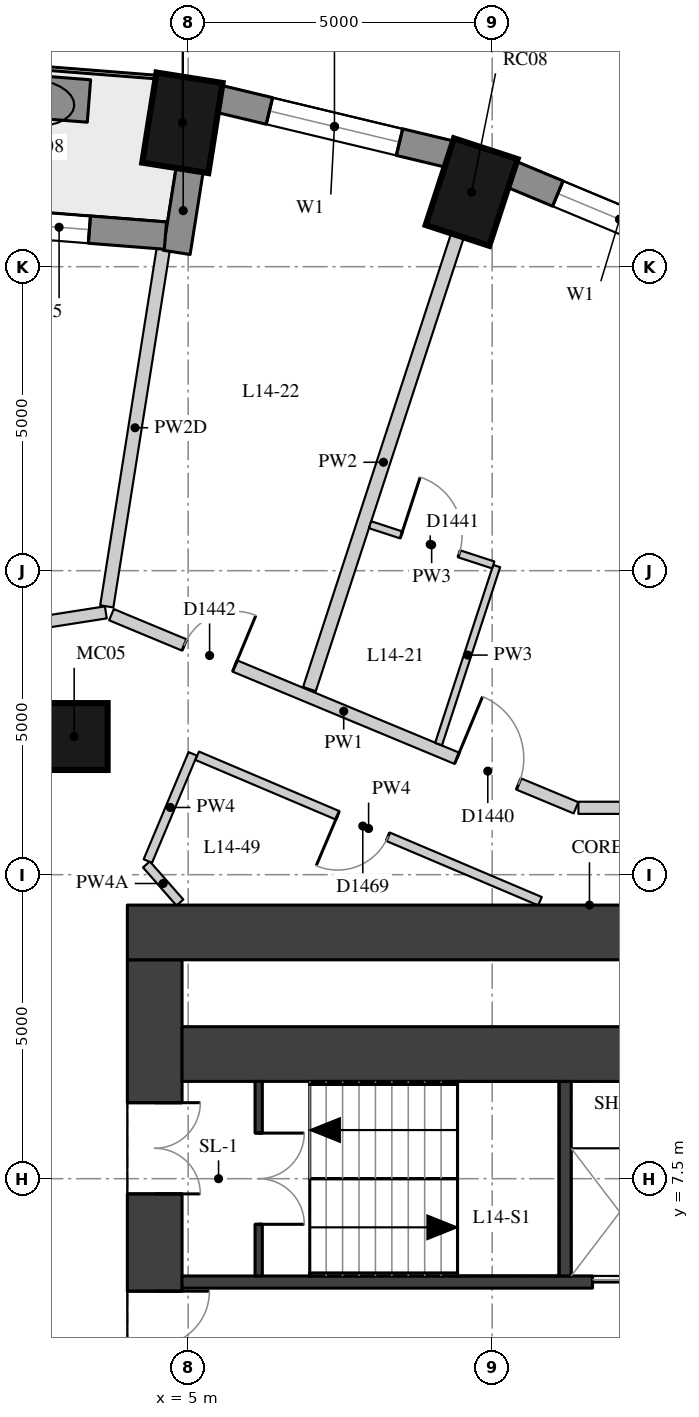
"""IFC4 building model, lengths in metres.
Left out: names, types, materials, properties, quantities, classifications, styles, units other than length and angle.
Written with IfcOpenShell. Run it as: python <this file> out.ifc"""

import sys

from ifc_helpers import new_model, si_unit, direction, frame, frame_2d, origin, origin_2d, place, context, subcontext, project, spatial, rectangle, extrude, element, fill, save


model = new_model("IFC4")
c1 = context("Model", 3, precision=1e-05, world=origin(), true_north=direction((0.0, 1.0)))
c2 = subcontext(c1, "Body", "Model", "MODEL_VIEW")
j1 = project(units=[si_unit("LENGTHUNIT", "METRE"), si_unit("PLANEANGLEUNIT", "RADIAN")], contexts=[c1])
p1 = place(None, origin())
s1 = spatial("IfcSite", under=j1, at=p1, CompositionType="ELEMENT")
p2 = place(p1, origin())
s2 = spatial("IfcBuilding", under=s1, at=p2, CompositionType="ELEMENT")
p3 = place(p2, frame((0.0, 0.0, 54.7)))
s3 = spatial("IfcBuildingStorey", under=s2, at=p3, CompositionType="ELEMENT", Elevation=54.7)
for number, where, z_axis, x_axis in (
    (1, (9.662, 23.727, 0.0), (0.0, 0.0, 1.0), (0.31, 0.951, 0.0)),
    (2, (4.906, 24.866, 0.0), (0.0, 0.0, 1.0), (0.156, 0.988, 0.0)),
):
    element("IfcColumn", number, at=place(p3, frame(where, z_axis=z_axis, x_axis=x_axis)), inside=s3, PredefinedType="COLUMN", context=c2, shape_type="SweptSolid", body=[
        extrude(rectangle(XDim=1.5, YDim=1.1, at=origin_2d()), origin(), (0.0, 0.0, 1.0), 3.3),
    ])
p4 = place(p3, frame((3.126, 14.772, 0.0), z_axis=(0.0, 0.0, 1.0), x_axis=(1.0, 0.0, 0.0)))
e3 = element("IfcColumn", 3, at=p4, inside=s3, PredefinedType="COLUMN", context=c2, shape_type="SweptSolid", body=[
    extrude(rectangle(XDim=1.1, YDim=1.1, at=origin_2d()), origin(), (0.0, 0.0, 1.0), 3.3),
])
p5 = place(p3, frame((13.875, 22.537, 0.0), z_axis=(0.0, 0.0, 1.0), x_axis=(-0.923031964282, 0.384723267966, 0.0)))
e4 = element("IfcWall", 4, at=p5, inside=s3, PredefinedType="SOLIDWALL", context=c2, shape_type="SweptSolid", body=[
    extrude(rectangle(XDim=3.856, YDim=0.45, at=frame_2d((1.928, 0.0))), origin(), (0.0, 0.0, 1.0), 3.02),
])
p6 = place(p5, frame((0.828, 0.0, 0.4)))
e5 = element("IfcOpeningElement", 5, at=p6, cuts=e4, PredefinedType="OPENING", context=c2, shape_type="SweptSolid", body=[
    extrude(rectangle(XDim=2.2, YDim=1.75, at=frame_2d((1.1, 0.875))), frame((0.0, 0.235, 0.0), z_axis=(0.0, -1.0, 0.0), x_axis=(1.0, 0.0, 0.0)), (0.0, 0.0, 1.0), 0.47),
])
p7 = place(p3, frame((9.308, 24.35, 0.0), z_axis=(0.0, 0.0, 1.0), x_axis=(-0.972496561493, 0.232917233979, 0.0)))
e6 = element("IfcWall", 6, at=p7, inside=s3, PredefinedType="SOLIDWALL", context=c2, shape_type="SweptSolid", body=[
    extrude(rectangle(XDim=3.911, YDim=0.45, at=frame_2d((1.956, 0.0))), origin(), (0.0, 0.0, 1.0), 3.02),
])
p8 = place(p7, frame((0.855, 0.0, 0.4)))
e7 = element("IfcOpeningElement", 7, at=p8, cuts=e6, PredefinedType="OPENING", context=c2, shape_type="SweptSolid", body=[
    extrude(rectangle(XDim=2.2, YDim=1.75, at=frame_2d((1.1, 0.875))), frame((0.0, 0.235, 0.0), z_axis=(0.0, -1.0, 0.0), x_axis=(1.0, 0.0, 0.0)), (0.0, 0.0, 1.0), 0.47),
])
p9 = place(p3, frame((5.027, 24.108, 0.0), z_axis=(0.0, 0.0, 1.0), x_axis=(-0.156133927791, -0.98773589415, 0.0)))
e8 = element("IfcWall", 8, at=p9, inside=s3, PredefinedType="SOLIDWALL", context=c2, shape_type="SweptSolid", body=[
    extrude(rectangle(XDim=1.39, YDim=0.45, at=frame_2d((0.695, 0.0))), origin(), (0.0, 0.0, 1.0), 2.47),
])
p10 = place(p3, frame((4.626, 23.011, 0.0), z_axis=(0.0, 0.0, 1.0), x_axis=(-0.996937095772, 0.078207589615, 0.0)))
e9 = element("IfcWall", 9, at=p10, inside=s3, PredefinedType="SOLIDWALL", context=c2, shape_type="SweptSolid", body=[
    extrude(rectangle(XDim=4.657, YDim=0.45, at=frame_2d((2.329, 0.0))), origin(), (0.0, 0.0, 1.0), 3.02),
])
p11 = place(p10, frame((1.254, 0.0, 0.4)))
e10 = element("IfcOpeningElement", 10, at=p11, cuts=e9, PredefinedType="OPENING", context=c2, shape_type="SweptSolid", body=[
    extrude(rectangle(XDim=1.0, YDim=1.75, at=frame_2d((0.5, 0.875))), frame((0.0, 0.235, 0.0), z_axis=(0.0, -1.0, 0.0), x_axis=(1.0, 0.0, 0.0)), (0.0, 0.0, 1.0), 0.47),
])
p12 = place(p10, frame((2.404, 0.0, 0.0)))
e11 = element("IfcOpeningElement", 11, at=p12, cuts=e9, PredefinedType="OPENING", context=c2, shape_type="SweptSolid", body=[
    extrude(rectangle(XDim=1.0, YDim=2.15, at=frame_2d((0.5, 1.075))), frame((0.0, 0.235, 0.0), z_axis=(0.0, -1.0, 0.0), x_axis=(1.0, 0.0, 0.0)), (0.0, 0.0, 1.0), 0.47),
])
p13 = place(p3, frame((3.369, 25.225, 0.0), z_axis=(0.0, 0.0, 1.0), x_axis=(-0.996965267018, 0.077847648384, 0.0)))
e12 = element("IfcWall", 12, at=p13, inside=s3, PredefinedType="USERDEFINED", context=c2, shape_type="SweptSolid", body=[
    extrude(rectangle(XDim=1.8, YDim=0.7, at=frame_2d((0.9, 0.0))), origin(), (0.0, 0.0, 1.0), 0.75),
])
p14 = place(p3, frame((4.45, -11.1, 0.0), z_axis=(0.0, 0.0, 1.0), x_axis=(0.0, 1.0, 0.0)))
e13 = element("IfcWall", 13, at=p14, inside=s3, PredefinedType="SHEAR", context=c2, shape_type="SweptSolid", body=[
    extrude(rectangle(XDim=22.2, YDim=0.9, at=frame_2d((11.1, 0.0))), origin(), (0.0, 0.0, 1.0), 3.02),
])
p15 = place(p14, frame((2.35, 0.0, 0.0)))
e14 = element("IfcOpeningElement", 14, at=p15, cuts=e13, PredefinedType="OPENING", context=c2, shape_type="SweptSolid", body=[
    extrude(rectangle(XDim=1.5, YDim=2.1, at=frame_2d((0.75, 1.05))), frame((0.0, 0.46, 0.0), z_axis=(0.0, -1.0, 0.0), x_axis=(1.0, 0.0, 0.0)), (0.0, 0.0, 1.0), 0.92),
])
p16 = place(p14, frame((5.45, 0.0, 0.0)))
e15 = element("IfcOpeningElement", 15, at=p16, cuts=e13, PredefinedType="OPENING", context=c2, shape_type="SweptSolid", body=[
    extrude(rectangle(XDim=1.8, YDim=2.1, at=frame_2d((0.9, 1.05))), frame((0.0, 0.46, 0.0), z_axis=(0.0, -1.0, 0.0), x_axis=(1.0, 0.0, 0.0)), (0.0, 0.0, 1.0), 0.92),
])
p17 = place(p14, frame((7.95, 0.0, 0.0)))
e16 = element("IfcOpeningElement", 16, at=p17, cuts=e13, PredefinedType="OPENING", context=c2, shape_type="SweptSolid", body=[
    extrude(rectangle(XDim=1.1, YDim=2.1, at=frame_2d((0.55, 1.05))), frame((0.0, 0.46, 0.0), z_axis=(0.0, -1.0, 0.0), x_axis=(1.0, 0.0, 0.0)), (0.0, 0.0, 1.0), 0.92),
])
p18 = place(p14, frame((10.6, 0.0, 0.0)))
e17 = element("IfcOpeningElement", 17, at=p18, cuts=e13, PredefinedType="OPENING", context=c2, shape_type="SweptSolid", body=[
    extrude(rectangle(XDim=1.0, YDim=2.1, at=frame_2d((0.5, 1.05))), frame((0.0, 0.46, 0.0), z_axis=(0.0, -1.0, 0.0), x_axis=(1.0, 0.0, 0.0)), (0.0, 0.0, 1.0), 0.92),
])
p19 = place(p14, frame((13.15, 0.0, 0.0)))
e18 = element("IfcOpeningElement", 18, at=p19, cuts=e13, PredefinedType="OPENING", context=c2, shape_type="SweptSolid", body=[
    extrude(rectangle(XDim=1.1, YDim=2.1, at=frame_2d((0.55, 1.05))), frame((0.0, 0.46, 0.0), z_axis=(0.0, -1.0, 0.0), x_axis=(1.0, 0.0, 0.0)), (0.0, 0.0, 1.0), 0.92),
])
p20 = place(p14, frame((14.95, 0.0, 0.0)))
e19 = element("IfcOpeningElement", 19, at=p20, cuts=e13, PredefinedType="OPENING", context=c2, shape_type="SweptSolid", body=[
    extrude(rectangle(XDim=1.8, YDim=2.1, at=frame_2d((0.9, 1.05))), frame((0.0, 0.46, 0.0), z_axis=(0.0, -1.0, 0.0), x_axis=(1.0, 0.0, 0.0)), (0.0, 0.0, 1.0), 0.92),
])
p21 = place(p14, frame((18.35, 0.0, 0.0)))
e20 = element("IfcOpeningElement", 20, at=p21, cuts=e13, PredefinedType="OPENING", context=c2, shape_type="SweptSolid", body=[
    extrude(rectangle(XDim=1.5, YDim=2.1, at=frame_2d((0.75, 1.05))), frame((0.0, 0.46, 0.0), z_axis=(0.0, -1.0, 0.0), x_axis=(1.0, 0.0, 0.0)), (0.0, 0.0, 1.0), 0.92),
])
p22 = place(p3, frame((4.0, 11.55, 0.0), z_axis=(0.0, 0.0, 1.0), x_axis=(1.0, 0.0, 0.0)))
e21 = element("IfcWall", 21, at=p22, inside=s3, PredefinedType="SHEAR", context=c2, shape_type="SweptSolid", body=[
    extrude(rectangle(XDim=15.2, YDim=0.9, at=frame_2d((7.6, 0.0))), origin(), (0.0, 0.0, 1.0), 3.02),
])
p23 = place(p3, frame((4.9, 9.55, 0.0), z_axis=(0.0, 0.0, 1.0), x_axis=(1.0, 0.0, 0.0)))
e22 = element("IfcWall", 22, at=p23, inside=s3, PredefinedType="SHEAR", context=c2, shape_type="SweptSolid", body=[
    extrude(rectangle(XDim=10.2, YDim=0.9, at=frame_2d((5.1, 0.0))), origin(), (0.0, 0.0, 1.0), 3.02),
])
p24 = place(p3, frame((4.9, 5.8, 0.0), z_axis=(0.0, 0.0, 1.0), x_axis=(1.0, 0.0, 0.0)))
e23 = element("IfcWall", 23, at=p24, inside=s3, PredefinedType="SHEAR", context=c2, shape_type="SweptSolid", body=[
    extrude(rectangle(XDim=10.2, YDim=0.2, at=frame_2d((5.1, 0.0))), origin(), (0.0, 0.0, 1.0), 3.02),
])
p25 = place(p24, frame((6.75, 0.0, 0.0)))
e24 = element("IfcOpeningElement", 24, at=p25, cuts=e23, PredefinedType="OPENING", context=c2, shape_type="SweptSolid", body=[
    extrude(rectangle(XDim=1.1, YDim=2.1, at=frame_2d((0.55, 1.05))), frame((0.0, 0.11, 0.0), z_axis=(0.0, -1.0, 0.0), x_axis=(1.0, 0.0, 0.0)), (0.0, 0.0, 1.0), 0.22),
])
p26 = place(p24, frame((8.75, 0.0, 0.0)))
e25 = element("IfcOpeningElement", 25, at=p26, cuts=e23, PredefinedType="OPENING", context=c2, shape_type="SweptSolid", body=[
    extrude(rectangle(XDim=1.1, YDim=2.1, at=frame_2d((0.55, 1.05))), frame((0.0, 0.11, 0.0), z_axis=(0.0, -1.0, 0.0), x_axis=(1.0, 0.0, 0.0)), (0.0, 0.0, 1.0), 0.22),
])
p27 = place(p3, frame((11.2, 5.9, 0.0), z_axis=(0.0, 0.0, 1.0), x_axis=(0.0, 1.0, 0.0)))
e26 = element("IfcWall", 26, at=p27, inside=s3, PredefinedType="SHEAR", context=c2, shape_type="SweptSolid", body=[
    extrude(rectangle(XDim=3.2, YDim=0.2, at=frame_2d((1.6, 0.0))), origin(), (0.0, 0.0, 1.0), 3.02),
])
p28 = place(p3, frame((6.16, 5.9, 0.0), z_axis=(0.0, 0.0, 1.0), x_axis=(0.0, 1.0, 0.0)))
e27 = element("IfcWall", 27, at=p28, inside=s3, PredefinedType="SHEAR", context=c2, shape_type="SweptSolid", body=[
    extrude(rectangle(XDim=3.2, YDim=0.12, at=frame_2d((1.6, 0.0))), origin(), (0.0, 0.0, 1.0), 3.02),
])
p29 = place(p28, frame((0.85, 0.0, 0.0)))
e28 = element("IfcOpeningElement", 28, at=p29, cuts=e27, PredefinedType="OPENING", context=c2, shape_type="SweptSolid", body=[
    extrude(rectangle(XDim=1.5, YDim=2.1, at=frame_2d((0.75, 1.05))), frame((0.0, 0.07, 0.0), z_axis=(0.0, -1.0, 0.0), x_axis=(1.0, 0.0, 0.0)), (0.0, 0.0, 1.0), 0.14),
])
p30 = place(p3, frame((-7.234, 15.11, 0.0), z_axis=(0.0, 0.0, 1.0), x_axis=(0.987957763282, 0.154723811906, 0.0)))
e29 = element("IfcWall", 29, at=p30, inside=s3, PredefinedType="PARTITIONING", context=c2, shape_type="SweptSolid", body=[
    extrude(rectangle(XDim=11.012, YDim=0.2, at=frame_2d((5.506, 0.0))), origin(), (0.0, 0.0, 1.0), 3.02),
])
p31 = place(p30, frame((8.605, 0.0, 0.0)))
e30 = element("IfcOpeningElement", 30, at=p31, cuts=e29, PredefinedType="OPENING", context=c2, shape_type="SweptSolid", body=[
    extrude(rectangle(XDim=0.9, YDim=2.1, at=frame_2d((0.45, 1.05))), frame((0.0, 0.11, 0.0), z_axis=(0.0, -1.0, 0.0), x_axis=(1.0, 0.0, 0.0)), (0.0, 0.0, 1.0), 0.22),
])
p32 = place(p30, frame((5.116, 0.0, 0.0)))
e31 = element("IfcOpeningElement", 31, at=p32, cuts=e29, PredefinedType="OPENING", context=c2, shape_type="SweptSolid", body=[
    extrude(rectangle(XDim=0.9, YDim=2.1, at=frame_2d((0.45, 1.05))), frame((0.0, 0.11, 0.0), z_axis=(0.0, -1.0, 0.0), x_axis=(1.0, 0.0, 0.0)), (0.0, 0.0, 1.0), 0.22),
])
p33 = place(p30, frame((1.626, 0.0, 0.0)))
e32 = element("IfcOpeningElement", 32, at=p33, cuts=e29, PredefinedType="OPENING", context=c2, shape_type="SweptSolid", body=[
    extrude(rectangle(XDim=0.9, YDim=2.1, at=frame_2d((0.45, 1.05))), frame((0.0, 0.11, 0.0), z_axis=(0.0, -1.0, 0.0), x_axis=(1.0, 0.0, 0.0)), (0.0, 0.0, 1.0), 0.22),
])
p34 = place(p3, frame((3.739, 16.776, 0.0), z_axis=(0.0, 0.0, 1.0), x_axis=(0.923364778497, -0.383923802117, 0.0)))
e33 = element("IfcWall", 33, at=p34, inside=s3, PredefinedType="PARTITIONING", context=c2, shape_type="SweptSolid", body=[
    extrude(rectangle(XDim=8.273, YDim=0.2, at=frame_2d((4.137, 0.0))), origin(), (0.0, 0.0, 1.0), 3.02),
])
p35 = place(p34, frame((6.153, 0.0, 0.0)))
e34 = element("IfcOpeningElement", 34, at=p35, cuts=e33, PredefinedType="OPENING", context=c2, shape_type="SweptSolid", body=[
    extrude(rectangle(XDim=1.1, YDim=2.1, at=frame_2d((0.55, 1.05))), frame((0.0, 0.11, 0.0), z_axis=(0.0, -1.0, 0.0), x_axis=(1.0, 0.0, 0.0)), (0.0, 0.0, 1.0), 0.22),
])
p36 = place(p34, frame((1.298, 0.0, 0.0)))
e35 = element("IfcOpeningElement", 35, at=p36, cuts=e33, PredefinedType="OPENING", context=c2, shape_type="SweptSolid", body=[
    extrude(rectangle(XDim=0.9, YDim=2.1, at=frame_2d((0.45, 1.05))), frame((0.0, 0.11, 0.0), z_axis=(0.0, -1.0, 0.0), x_axis=(1.0, 0.0, 0.0)), (0.0, 0.0, 1.0), 0.22),
])
p37 = place(p3, frame((11.418, 13.6, 0.0), z_axis=(0.0, 0.0, 1.0), x_axis=(1.0, 0.0, 0.0)))
e36 = element("IfcWall", 36, at=p37, inside=s3, PredefinedType="PARTITIONING", context=c2, shape_type="SweptSolid", body=[
    extrude(rectangle(XDim=9.382, YDim=0.2, at=frame_2d((4.691, 0.0))), origin(), (0.0, 0.0, 1.0), 3.02),
])
p38 = place(p3, frame((4.865, 12.042, 0.0), z_axis=(0.0, 0.0, 1.0), x_axis=(-0.660014599896, 0.751252772323, 0.0)))
e37 = element("IfcWall", 37, at=p38, inside=s3, PredefinedType="PARTITIONING", context=c2, shape_type="SweptSolid", body=[
    extrude(rectangle(XDim=0.835, YDim=0.15, at=frame_2d((0.417, 0.0))), origin(), (0.0, 0.0, 1.0), 2.57),
])
p39 = place(p3, frame((4.337, 12.724, 0.0), z_axis=(0.0, 0.0, 1.0), x_axis=(0.386537433901, 0.922273718694, 0.0)))
e38 = element("IfcWall", 38, at=p39, inside=s3, PredefinedType="PARTITIONING", context=c2, shape_type="SweptSolid", body=[
    extrude(rectangle(XDim=1.911, YDim=0.15, at=frame_2d((0.956, 0.0))), origin(), (0.0, 0.0, 1.0), 3.02),
])
p40 = place(p3, frame((5.149, 14.456, 0.0), z_axis=(0.0, 0.0, 1.0), x_axis=(0.920541383735, -0.390645057348, 0.0)))
e39 = element("IfcWall", 39, at=p40, inside=s3, PredefinedType="PARTITIONING", context=c2, shape_type="SweptSolid", body=[
    extrude(rectangle(XDim=6.124, YDim=0.15, at=frame_2d((3.062, 0.0))), origin(), (0.0, 0.0, 1.0), 3.02),
])
p41 = place(p40, frame((2.508, 0.0, 0.0)))
e40 = element("IfcOpeningElement", 40, at=p41, cuts=e39, PredefinedType="OPENING", context=c2, shape_type="SweptSolid", body=[
    extrude(rectangle(XDim=0.9, YDim=2.1, at=frame_2d((0.45, 1.05))), frame((0.0, 0.085, 0.0), z_axis=(0.0, -1.0, 0.0), x_axis=(1.0, 0.0, 0.0)), (0.0, 0.0, 1.0), 0.17),
])
p42 = place(p3, frame((9.429, 23.014, 0.0), z_axis=(0.0, 0.0, 1.0), x_axis=(-0.310230839568, -0.950661257326, 0.0)))
e41 = element("IfcWall", 41, at=p42, inside=s3, PredefinedType="PARTITIONING", context=c2, shape_type="SweptSolid", body=[
    extrude(rectangle(XDim=7.849, YDim=0.22, at=frame_2d((3.925, 0.0))), origin(), (0.0, 0.0, 1.0), 3.02),
])
p43 = place(p3, frame((4.591, 22.789, 0.0), z_axis=(0.0, 0.0, 1.0), x_axis=(-0.156126964527, -0.987736994826, 0.0)))
e42 = element("IfcWall", 42, at=p43, inside=s3, PredefinedType="PARTITIONING", context=c2, shape_type="SweptSolid", body=[
    extrude(rectangle(XDim=5.948, YDim=0.22, at=frame_2d((2.974, 0.0))), origin(), (0.0, 0.0, 1.0), 2.47),
])
p44 = place(p3, frame((9.118, 14.648, 0.0), z_axis=(0.0, 0.0, 1.0), x_axis=(0.310277544614, 0.950646014723, 0.0)))
e43 = element("IfcWall", 43, at=p44, inside=s3, PredefinedType="PARTITIONING", context=c2, shape_type="SweptSolid", body=[
    extrude(rectangle(XDim=3.081, YDim=0.12, at=frame_2d((1.54, 0.0))), origin(), (0.0, 0.0, 1.0), 3.02),
])
p45 = place(p3, frame((10.017, 17.594, 0.0), z_axis=(0.0, 0.0, 1.0), x_axis=(-0.950613738429, 0.310376417129, 0.0)))
e44 = element("IfcWall", 44, at=p45, inside=s3, PredefinedType="PARTITIONING", context=c2, shape_type="SweptSolid", body=[
    extrude(rectangle(XDim=2.13, YDim=0.12, at=frame_2d((1.065, 0.0))), origin(), (0.0, 0.0, 1.0), 3.02),
])
p46 = place(p45, frame((0.59, 0.0, 0.0)))
e45 = element("IfcOpeningElement", 45, at=p46, cuts=e44, PredefinedType="OPENING", context=c2, shape_type="SweptSolid", body=[
    extrude(rectangle(XDim=1.0, YDim=2.1, at=frame_2d((0.5, 1.05))), frame((0.0, 0.07, 0.0), z_axis=(0.0, -1.0, 0.0), x_axis=(1.0, 0.0, 0.0)), (0.0, 0.0, 1.0), 0.14),
])
p47 = place(p6, origin())
e46 = element("IfcWindow", 46, at=p47, inside=s3, PartitioningType="SINGLE_PANEL", PredefinedType="WINDOW", context=c2, shape_type="SweptSolid", body=[
    extrude(rectangle(XDim=2.2, YDim=1.75, at=frame_2d((1.1, 0.875))), frame((0.0, 0.035, 0.0), z_axis=(0.0, -1.0, 0.0), x_axis=(1.0, 0.0, 0.0)), (0.0, 0.0, 1.0), 0.06),
])
fill(e5, e46)
p48 = place(p8, origin())
e47 = element("IfcWindow", 47, at=p48, inside=s3, PartitioningType="SINGLE_PANEL", PredefinedType="WINDOW", context=c2, shape_type="SweptSolid", body=[
    extrude(rectangle(XDim=2.2, YDim=1.75, at=frame_2d((1.1, 0.875))), frame((0.0, 0.035, 0.0), z_axis=(0.0, -1.0, 0.0), x_axis=(1.0, 0.0, 0.0)), (0.0, 0.0, 1.0), 0.06),
])
fill(e7, e47)
p49 = place(p11, origin())
e48 = element("IfcWindow", 48, at=p49, inside=s3, PartitioningType="SINGLE_PANEL", PredefinedType="WINDOW", context=c2, shape_type="SweptSolid", body=[
    extrude(rectangle(XDim=1.0, YDim=1.75, at=frame_2d((0.5, 0.875))), frame((0.0, 0.035, 0.0), z_axis=(0.0, -1.0, 0.0), x_axis=(1.0, 0.0, 0.0)), (0.0, 0.0, 1.0), 0.06),
])
fill(e10, e48)
p50 = place(p20, origin())
e49 = element("IfcDoor", 49, at=p50, inside=s3, OperationType="DOUBLE_DOOR_SINGLE_SWING", PredefinedType="DOOR", context=c2, shape_type="SweptSolid", body=[
    extrude(rectangle(XDim=1.8, YDim=2.1, at=frame_2d((0.9, 1.05))), frame((0.0, 0.025, 0.0), z_axis=(0.0, -1.0, 0.0), x_axis=(1.0, 0.0, 0.0)), (0.0, 0.0, 1.0), 0.05),
])
fill(e19, e49)
p51 = place(p21, origin())
e50 = element("IfcDoor", 50, at=p51, inside=s3, OperationType="DOUBLE_DOOR_SINGLE_SWING", PredefinedType="DOOR", context=c2, shape_type="SweptSolid", body=[
    extrude(rectangle(XDim=1.5, YDim=2.1, at=frame_2d((0.75, 1.05))), frame((0.0, 0.025, 0.0), z_axis=(0.0, -1.0, 0.0), x_axis=(1.0, 0.0, 0.0)), (0.0, 0.0, 1.0), 0.05),
])
fill(e20, e50)
p52 = place(p29, origin())
e51 = element("IfcDoor", 51, at=p52, inside=s3, OperationType="DOUBLE_DOOR_SINGLE_SWING", PredefinedType="DOOR", context=c2, shape_type="SweptSolid", body=[
    extrude(rectangle(XDim=1.5, YDim=2.1, at=frame_2d((0.75, 1.05))), frame((0.0, 0.025, 0.0), z_axis=(0.0, -1.0, 0.0), x_axis=(1.0, 0.0, 0.0)), (0.0, 0.0, 1.0), 0.05),
])
fill(e28, e51)
p53 = place(p25, origin())
e52 = element("IfcDoor", 52, at=p53, inside=s3, OperationType="DOUBLE_DOOR_SLIDING", PredefinedType="DOOR", context=c2, shape_type="SweptSolid", body=[
    extrude(rectangle(XDim=1.1, YDim=2.1, at=frame_2d((0.55, 1.05))), frame((0.0, 0.025, 0.0), z_axis=(0.0, -1.0, 0.0), x_axis=(1.0, 0.0, 0.0)), (0.0, 0.0, 1.0), 0.05),
])
fill(e24, e52)
p54 = place(p35, origin())
e53 = element("IfcDoor", 53, at=p54, inside=s3, OperationType="SINGLE_SWING_LEFT", PredefinedType="DOOR", context=c2, shape_type="SweptSolid", body=[
    extrude(rectangle(XDim=1.1, YDim=2.1, at=frame_2d((0.55, 1.05))), frame((0.0, 0.025, 0.0), z_axis=(0.0, -1.0, 0.0), x_axis=(1.0, 0.0, 0.0)), (0.0, 0.0, 1.0), 0.05),
])
fill(e34, e53)
p55 = place(p46, origin())
e54 = element("IfcDoor", 54, at=p55, inside=s3, OperationType="SINGLE_SWING_LEFT", PredefinedType="DOOR", context=c2, shape_type="SweptSolid", body=[
    extrude(rectangle(XDim=1.0, YDim=2.1, at=frame_2d((0.5, 1.05))), frame((0.0, 0.025, 0.0), z_axis=(0.0, -1.0, 0.0), x_axis=(1.0, 0.0, 0.0)), (0.0, 0.0, 1.0), 0.05),
])
fill(e45, e54)
p56 = place(p36, origin())
e55 = element("IfcDoor", 55, at=p56, inside=s3, OperationType="SINGLE_SWING_RIGHT", PredefinedType="DOOR", context=c2, shape_type="SweptSolid", body=[
    extrude(rectangle(XDim=0.9, YDim=2.1, at=frame_2d((0.45, 1.05))), frame((0.0, 0.025, 0.0), z_axis=(0.0, -1.0, 0.0), x_axis=(1.0, 0.0, 0.0)), (0.0, 0.0, 1.0), 0.05),
])
fill(e35, e55)
p57 = place(p41, origin())
e56 = element("IfcDoor", 56, at=p57, inside=s3, OperationType="SINGLE_SWING_RIGHT", PredefinedType="DOOR", context=c2, shape_type="SweptSolid", body=[
    extrude(rectangle(XDim=0.9, YDim=2.1, at=frame_2d((0.45, 1.05))), frame((0.0, 0.025, 0.0), z_axis=(0.0, -1.0, 0.0), x_axis=(1.0, 0.0, 0.0)), (0.0, 0.0, 1.0), 0.05),
])
fill(e40, e56)
save(model, sys.argv[1])
